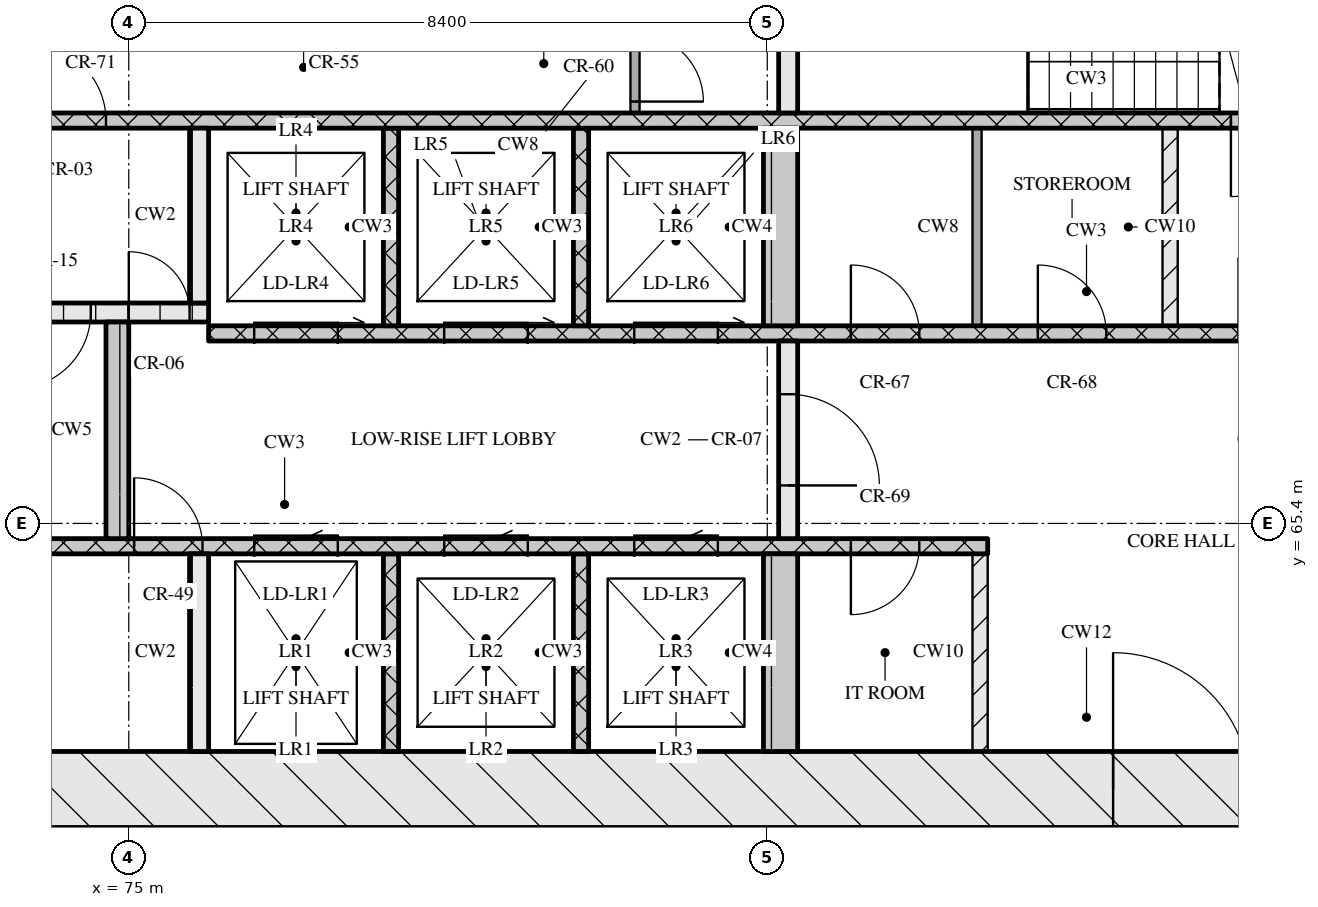
"""IFC4 building model, lengths in metres.
Left out: names, types, materials, properties, quantities, classifications, styles, units other than length and angle.
Written with IfcOpenShell. Run it as: python <this file> out.ifc"""

import sys

from ifc_helpers import new_model, si_unit, direction, frame, frame_2d, origin, place, context, subcontext, project, spatial, rectangle, extrude, element, fill, save


model = new_model("IFC4")
c1 = context("Model", 3, precision=1e-05, world=origin(), true_north=direction((0.0, 1.0)))
c2 = subcontext(c1, "Body", "Model", "MODEL_VIEW")
j1 = project(units=[si_unit("LENGTHUNIT", "METRE"), si_unit("PLANEANGLEUNIT", "RADIAN")], contexts=[c1])
p1 = place(None, origin())
s1 = spatial("IfcSite", under=j1, at=p1, CompositionType="ELEMENT")
p2 = place(p1, origin())
s2 = spatial("IfcBuilding", under=s1, at=p2, CompositionType="ELEMENT")
p3 = place(p2, frame((0.0, 0.0, 102.45)))
s3 = spatial("IfcBuildingStorey", under=s2, at=p3, CompositionType="ELEMENT", Elevation=102.45)
p4 = place(p3, frame((66.8, 61.9, 0.0), z_axis=(0.0, 0.0, 1.0), x_axis=(1.0, 0.0, 0.0)))
e1 = element("IfcWall", 1, at=p4, inside=s3, PredefinedType="SOLIDWALL", context=c2, shape_type="SweptSolid", body=[
    extrude(rectangle(XDim=41.6, YDim=1.0, at=frame_2d((20.8, 0.0))), origin(), (0.0, 0.0, 1.0), 3.32),
])
p5 = place(p4, frame((21.15, 0.0, 0.0)))
e2 = element("IfcOpeningElement", 2, at=p5, cuts=e1, PredefinedType="OPENING", context=c2, shape_type="SweptSolid", body=[
    extrude(rectangle(XDim=1.8, YDim=2.1, at=frame_2d((0.9, 1.05))), frame((0.0, 0.51, 0.0), z_axis=(0.0, -1.0, 0.0), x_axis=(1.0, 0.0, 0.0)), (0.0, 0.0, 1.0), 1.02),
])
p6 = place(p3, frame((75.925, 62.4, 0.0), z_axis=(0.0, 0.0, 1.0), x_axis=(0.0, 1.0, 0.0)))
e3 = element("IfcWall", 3, at=p6, inside=s3, PredefinedType="SOLIDWALL", context=c2, shape_type="SweptSolid", body=[
    extrude(rectangle(XDim=2.6, YDim=0.25, at=frame_2d((1.3, 0.0))), origin(), (0.0, 0.0, 1.0), 3.32),
])
for number, where, z_axis, x_axis in (
    (4, (78.45, 62.4, 0.0), (0.0, 0.0, 1.0), (0.0, 1.0, 0.0)),
    (5, (80.95, 62.4, 0.0), (0.0, 0.0, 1.0), (0.0, 1.0, 0.0)),
):
    element("IfcWall", number, at=place(p3, frame(where, z_axis=z_axis, x_axis=x_axis)), inside=s3, PredefinedType="SOLIDWALL", context=c2, shape_type="SweptSolid", body=[
        extrude(rectangle(XDim=2.6, YDim=0.2, at=frame_2d((1.3, 0.0))), origin(), (0.0, 0.0, 1.0), 3.32),
    ])
p7 = place(p3, frame((83.575, 62.4, 0.0), z_axis=(0.0, 0.0, 1.0), x_axis=(0.0, 1.0, 0.0)))
e6 = element("IfcWall", 6, at=p7, inside=s3, PredefinedType="SOLIDWALL", context=c2, shape_type="SweptSolid", body=[
    extrude(rectangle(XDim=2.6, YDim=0.45, at=frame_2d((1.3, 0.0))), origin(), (0.0, 0.0, 1.0), 3.32),
])
p8 = place(p3, frame((86.2, 62.4, 0.0), z_axis=(0.0, 0.0, 1.0), x_axis=(0.0, 1.0, 0.0)))
e7 = element("IfcWall", 7, at=p8, inside=s3, PredefinedType="PARTITIONING", context=c2, shape_type="SweptSolid", body=[
    extrude(rectangle(XDim=2.6, YDim=0.2, at=frame_2d((1.3, 0.0))), origin(), (0.0, 0.0, 1.0), 3.32),
])
p9 = place(p3, frame((67.8, 65.1, 0.0), z_axis=(0.0, 0.0, 1.0), x_axis=(1.0, 0.0, 0.0)))
e8 = element("IfcWall", 8, at=p9, inside=s3, PredefinedType="SOLIDWALL", context=c2, shape_type="SweptSolid", body=[
    extrude(rectangle(XDim=18.5, YDim=0.2, at=frame_2d((9.25, 0.0))), origin(), (0.0, 0.0, 1.0), 3.32),
])
p10 = place(p9, frame((7.27, 0.0, 0.0)))
e9 = element("IfcOpeningElement", 9, at=p10, cuts=e8, PredefinedType="OPENING", context=c2, shape_type="SweptSolid", body=[
    extrude(rectangle(XDim=0.9, YDim=2.1, at=frame_2d((0.45, 1.05))), frame((0.0, 0.11, 0.0), z_axis=(0.0, -1.0, 0.0), x_axis=(1.0, 0.0, 0.0)), (0.0, 0.0, 1.0), 0.22),
])
p11 = place(p9, frame((8.85, 0.0, 0.0)))
e10 = element("IfcOpeningElement", 10, at=p11, cuts=e8, PredefinedType="OPENING", context=c2, shape_type="SweptSolid", body=[
    extrude(rectangle(XDim=1.1, YDim=2.1, at=frame_2d((0.55, 1.05))), frame((0.0, 0.11, 0.0), z_axis=(0.0, -1.0, 0.0), x_axis=(1.0, 0.0, 0.0)), (0.0, 0.0, 1.0), 0.22),
])
p12 = place(p9, frame((11.35, 0.0, 0.0)))
e11 = element("IfcOpeningElement", 11, at=p12, cuts=e8, PredefinedType="OPENING", context=c2, shape_type="SweptSolid", body=[
    extrude(rectangle(XDim=1.1, YDim=2.1, at=frame_2d((0.55, 1.05))), frame((0.0, 0.11, 0.0), z_axis=(0.0, -1.0, 0.0), x_axis=(1.0, 0.0, 0.0)), (0.0, 0.0, 1.0), 0.22),
])
p13 = place(p9, frame((13.85, 0.0, 0.0)))
e12 = element("IfcOpeningElement", 12, at=p13, cuts=e8, PredefinedType="OPENING", context=c2, shape_type="SweptSolid", body=[
    extrude(rectangle(XDim=1.1, YDim=2.1, at=frame_2d((0.55, 1.05))), frame((0.0, 0.11, 0.0), z_axis=(0.0, -1.0, 0.0), x_axis=(1.0, 0.0, 0.0)), (0.0, 0.0, 1.0), 0.22),
])
p14 = place(p9, frame((16.7, 0.0, 0.0)))
e13 = element("IfcOpeningElement", 13, at=p14, cuts=e8, PredefinedType="OPENING", context=c2, shape_type="SweptSolid", body=[
    extrude(rectangle(XDim=0.9, YDim=2.1, at=frame_2d((0.45, 1.05))), frame((0.0, 0.11, 0.0), z_axis=(0.0, -1.0, 0.0), x_axis=(1.0, 0.0, 0.0)), (0.0, 0.0, 1.0), 0.22),
])
p15 = place(p3, frame((74.85, 65.2, 0.0), z_axis=(0.0, 0.0, 1.0), x_axis=(0.0, 1.0, 0.0)))
e14 = element("IfcWall", 14, at=p15, inside=s3, PredefinedType="SOLIDWALL", context=c2, shape_type="SweptSolid", body=[
    extrude(rectangle(XDim=2.85, YDim=0.3, at=frame_2d((1.425, 0.0))), origin(), (0.0, 0.0, 1.0), 3.32),
])
p16 = place(p3, frame((83.675, 65.2, 0.0), z_axis=(0.0, 0.0, 1.0), x_axis=(0.0, 1.0, 0.0)))
e15 = element("IfcWall", 15, at=p16, inside=s3, PredefinedType="SOLIDWALL", context=c2, shape_type="SweptSolid", body=[
    extrude(rectangle(XDim=2.6, YDim=0.25, at=frame_2d((1.3, 0.0))), origin(), (0.0, 0.0, 1.0), 3.32),
])
p17 = place(p16, frame((0.7, 0.0, 0.0)))
e16 = element("IfcOpeningElement", 16, at=p17, cuts=e15, PredefinedType="OPENING", context=c2, shape_type="SweptSolid", body=[
    extrude(rectangle(XDim=1.2, YDim=2.1, at=frame_2d((0.6, 1.05))), frame((0.0, 0.135, 0.0), z_axis=(0.0, -1.0, 0.0), x_axis=(1.0, 0.0, 0.0)), (0.0, 0.0, 1.0), 0.27),
])
p18 = place(p3, frame((76.05, 67.9, 0.0), z_axis=(0.0, 0.0, 1.0), x_axis=(1.0, 0.0, 0.0)))
e17 = element("IfcWall", 17, at=p18, inside=s3, PredefinedType="SOLIDWALL", context=c2, shape_type="SweptSolid", body=[
    extrude(rectangle(XDim=23.1, YDim=0.2, at=frame_2d((11.55, 0.0))), origin(), (0.0, 0.0, 1.0), 3.32),
])
p19 = place(p18, frame((0.6, 0.0, 0.0)))
e18 = element("IfcOpeningElement", 18, at=p19, cuts=e17, PredefinedType="OPENING", context=c2, shape_type="SweptSolid", body=[
    extrude(rectangle(XDim=1.1, YDim=2.1, at=frame_2d((0.55, 1.05))), frame((0.0, 0.11, 0.0), z_axis=(0.0, -1.0, 0.0), x_axis=(1.0, 0.0, 0.0)), (0.0, 0.0, 1.0), 0.22),
])
p20 = place(p18, frame((3.1, 0.0, 0.0)))
e19 = element("IfcOpeningElement", 19, at=p20, cuts=e17, PredefinedType="OPENING", context=c2, shape_type="SweptSolid", body=[
    extrude(rectangle(XDim=1.1, YDim=2.1, at=frame_2d((0.55, 1.05))), frame((0.0, 0.11, 0.0), z_axis=(0.0, -1.0, 0.0), x_axis=(1.0, 0.0, 0.0)), (0.0, 0.0, 1.0), 0.22),
])
p21 = place(p18, frame((5.6, 0.0, 0.0)))
e20 = element("IfcOpeningElement", 20, at=p21, cuts=e17, PredefinedType="OPENING", context=c2, shape_type="SweptSolid", body=[
    extrude(rectangle(XDim=1.1, YDim=2.1, at=frame_2d((0.55, 1.05))), frame((0.0, 0.11, 0.0), z_axis=(0.0, -1.0, 0.0), x_axis=(1.0, 0.0, 0.0)), (0.0, 0.0, 1.0), 0.22),
])
p22 = place(p18, frame((8.45, 0.0, 0.0)))
e21 = element("IfcOpeningElement", 21, at=p22, cuts=e17, PredefinedType="OPENING", context=c2, shape_type="SweptSolid", body=[
    extrude(rectangle(XDim=0.9, YDim=2.1, at=frame_2d((0.45, 1.05))), frame((0.0, 0.11, 0.0), z_axis=(0.0, -1.0, 0.0), x_axis=(1.0, 0.0, 0.0)), (0.0, 0.0, 1.0), 0.22),
])
p23 = place(p18, frame((10.91, 0.0, 0.0)))
e22 = element("IfcOpeningElement", 22, at=p23, cuts=e17, PredefinedType="OPENING", context=c2, shape_type="SweptSolid", body=[
    extrude(rectangle(XDim=0.9, YDim=2.1, at=frame_2d((0.45, 1.05))), frame((0.0, 0.11, 0.0), z_axis=(0.0, -1.0, 0.0), x_axis=(1.0, 0.0, 0.0)), (0.0, 0.0, 1.0), 0.22),
])
p24 = place(p18, frame((13.55, 0.0, 0.0)))
e23 = element("IfcOpeningElement", 23, at=p24, cuts=e17, PredefinedType="OPENING", context=c2, shape_type="SweptSolid", body=[
    extrude(rectangle(XDim=1.0, YDim=2.1, at=frame_2d((0.5, 1.05))), frame((0.0, 0.11, 0.0), z_axis=(0.0, -1.0, 0.0), x_axis=(1.0, 0.0, 0.0)), (0.0, 0.0, 1.0), 0.22),
])
for number, where, z_axis, x_axis in (
    (24, (78.45, 68.0, 0.0), (0.0, 0.0, 1.0), (0.0, 1.0, 0.0)),
    (25, (80.95, 68.0, 0.0), (0.0, 0.0, 1.0), (0.0, 1.0, 0.0)),
):
    element("IfcWall", number, at=place(p3, frame(where, z_axis=z_axis, x_axis=x_axis)), inside=s3, PredefinedType="SOLIDWALL", context=c2, shape_type="SweptSolid", body=[
        extrude(rectangle(XDim=2.6, YDim=0.2, at=frame_2d((1.3, 0.0))), origin(), (0.0, 0.0, 1.0), 3.32),
    ])
p25 = place(p3, frame((83.575, 68.0, 0.0), z_axis=(0.0, 0.0, 1.0), x_axis=(0.0, 1.0, 0.0)))
e26 = element("IfcWall", 26, at=p25, inside=s3, PredefinedType="SOLIDWALL", context=c2, shape_type="SweptSolid", body=[
    extrude(rectangle(XDim=2.6, YDim=0.45, at=frame_2d((1.3, 0.0))), origin(), (0.0, 0.0, 1.0), 3.32),
])
p26 = place(p3, frame((86.16, 68.0, 0.0), z_axis=(0.0, 0.0, 1.0), x_axis=(0.0, 1.0, 0.0)))
e27 = element("IfcWall", 27, at=p26, inside=s3, PredefinedType="PARTITIONING", context=c2, shape_type="SweptSolid", body=[
    extrude(rectangle(XDim=2.6, YDim=0.12, at=frame_2d((1.3, 0.0))), origin(), (0.0, 0.0, 1.0), 3.32),
])
p27 = place(p3, frame((88.7, 68.0, 0.0), z_axis=(0.0, 0.0, 1.0), x_axis=(0.0, 1.0, 0.0)))
e28 = element("IfcWall", 28, at=p27, inside=s3, PredefinedType="PARTITIONING", context=c2, shape_type="SweptSolid", body=[
    extrude(rectangle(XDim=2.6, YDim=0.2, at=frame_2d((1.3, 0.0))), origin(), (0.0, 0.0, 1.0), 3.32),
])
p28 = place(p3, frame((67.8, 68.175, 0.0), z_axis=(0.0, 0.0, 1.0), x_axis=(1.0, 0.0, 0.0)))
e29 = element("IfcWall", 29, at=p28, inside=s3, PredefinedType="SOLIDWALL", context=c2, shape_type="SweptSolid", body=[
    extrude(rectangle(XDim=8.25, YDim=0.25, at=frame_2d((4.125, 0.0))), origin(), (0.0, 0.0, 1.0), 3.32),
])
p29 = place(p28, frame((5.7, 0.0, 0.0)))
e30 = element("IfcOpeningElement", 30, at=p29, cuts=e29, PredefinedType="OPENING", context=c2, shape_type="SweptSolid", body=[
    extrude(rectangle(XDim=1.0, YDim=2.1, at=frame_2d((0.5, 1.05))), frame((0.0, 0.135, 0.0), z_axis=(0.0, -1.0, 0.0), x_axis=(1.0, 0.0, 0.0)), (0.0, 0.0, 1.0), 0.27),
])
p30 = place(p28, frame((7.2, 0.0, 0.0)))
e31 = element("IfcOpeningElement", 31, at=p30, cuts=e29, PredefinedType="OPENING", context=c2, shape_type="SweptSolid", body=[
    extrude(rectangle(XDim=0.8, YDim=2.1, at=frame_2d((0.4, 1.05))), frame((0.0, 0.135, 0.0), z_axis=(0.0, -1.0, 0.0), x_axis=(1.0, 0.0, 0.0)), (0.0, 0.0, 1.0), 0.27),
])
p31 = place(p3, frame((75.925, 68.3, 0.0), z_axis=(0.0, 0.0, 1.0), x_axis=(0.0, 1.0, 0.0)))
e32 = element("IfcWall", 32, at=p31, inside=s3, PredefinedType="SOLIDWALL", context=c2, shape_type="SweptSolid", body=[
    extrude(rectangle(XDim=2.3, YDim=0.25, at=frame_2d((1.15, 0.0))), origin(), (0.0, 0.0, 1.0), 3.32),
])
p32 = place(p3, frame((67.8, 70.7, 0.0), z_axis=(0.0, 0.0, 1.0), x_axis=(1.0, 0.0, 0.0)))
e33 = element("IfcWall", 33, at=p32, inside=s3, PredefinedType="SOLIDWALL", context=c2, shape_type="SweptSolid", body=[
    extrude(rectangle(XDim=39.6, YDim=0.2, at=frame_2d((19.8, 0.0))), origin(), (0.0, 0.0, 1.0), 3.32),
])
p33 = place(p32, frame((0.65, 0.0, 0.0)))
e34 = element("IfcOpeningElement", 34, at=p33, cuts=e33, PredefinedType="OPENING", context=c2, shape_type="SweptSolid", body=[
    extrude(rectangle(XDim=1.1, YDim=2.1, at=frame_2d((0.55, 1.05))), frame((0.0, 0.11, 0.0), z_axis=(0.0, -1.0, 0.0), x_axis=(1.0, 0.0, 0.0)), (0.0, 0.0, 1.0), 0.22),
])
p34 = place(p32, frame((3.25, 0.0, 0.0)))
e35 = element("IfcOpeningElement", 35, at=p34, cuts=e33, PredefinedType="OPENING", context=c2, shape_type="SweptSolid", body=[
    extrude(rectangle(XDim=1.1, YDim=2.1, at=frame_2d((0.55, 1.05))), frame((0.0, 0.11, 0.0), z_axis=(0.0, -1.0, 0.0), x_axis=(1.0, 0.0, 0.0)), (0.0, 0.0, 1.0), 0.22),
])
p35 = place(p32, frame((5.9, 0.0, 0.0)))
e36 = element("IfcOpeningElement", 36, at=p35, cuts=e33, PredefinedType="OPENING", context=c2, shape_type="SweptSolid", body=[
    extrude(rectangle(XDim=1.0, YDim=2.1, at=frame_2d((0.5, 1.05))), frame((0.0, 0.11, 0.0), z_axis=(0.0, -1.0, 0.0), x_axis=(1.0, 0.0, 0.0)), (0.0, 0.0, 1.0), 0.22),
])
p36 = place(p32, frame((21.7, 0.0, 0.0)))
e37 = element("IfcOpeningElement", 37, at=p36, cuts=e33, PredefinedType="OPENING", context=c2, shape_type="SweptSolid", body=[
    extrude(rectangle(XDim=1.0, YDim=2.1, at=frame_2d((0.5, 1.05))), frame((0.0, 0.11, 0.0), z_axis=(0.0, -1.0, 0.0), x_axis=(1.0, 0.0, 0.0)), (0.0, 0.0, 1.0), 0.22),
])
p37 = place(p32, frame((32.7, 0.0, 0.0)))
e38 = element("IfcOpeningElement", 38, at=p37, cuts=e33, PredefinedType="OPENING", context=c2, shape_type="SweptSolid", body=[
    extrude(rectangle(XDim=1.0, YDim=2.1, at=frame_2d((0.5, 1.05))), frame((0.0, 0.11, 0.0), z_axis=(0.0, -1.0, 0.0), x_axis=(1.0, 0.0, 0.0)), (0.0, 0.0, 1.0), 0.22),
])
p38 = place(p32, frame((35.25, 0.0, 0.0)))
e39 = element("IfcOpeningElement", 39, at=p38, cuts=e33, PredefinedType="OPENING", context=c2, shape_type="SweptSolid", body=[
    extrude(rectangle(XDim=1.1, YDim=2.1, at=frame_2d((0.55, 1.05))), frame((0.0, 0.11, 0.0), z_axis=(0.0, -1.0, 0.0), x_axis=(1.0, 0.0, 0.0)), (0.0, 0.0, 1.0), 0.22),
])
p39 = place(p32, frame((37.85, 0.0, 0.0)))
e40 = element("IfcOpeningElement", 40, at=p39, cuts=e33, PredefinedType="OPENING", context=c2, shape_type="SweptSolid", body=[
    extrude(rectangle(XDim=1.1, YDim=2.1, at=frame_2d((0.55, 1.05))), frame((0.0, 0.11, 0.0), z_axis=(0.0, -1.0, 0.0), x_axis=(1.0, 0.0, 0.0)), (0.0, 0.0, 1.0), 0.22),
])
p40 = place(p3, frame((81.66, 70.8, 0.0), z_axis=(0.0, 0.0, 1.0), x_axis=(0.0, 1.0, 0.0)))
e41 = element("IfcWall", 41, at=p40, inside=s3, PredefinedType="PARTITIONING", context=c2, shape_type="SweptSolid", body=[
    extrude(rectangle(XDim=1.2, YDim=0.12, at=frame_2d((0.6, 0.0))), origin(), (0.0, 0.0, 1.0), 3.32),
])
p41 = place(p40, frame((0.15, 0.0, 0.0)))
e42 = element("IfcOpeningElement", 42, at=p41, cuts=e41, PredefinedType="OPENING", context=c2, shape_type="SweptSolid", body=[
    extrude(rectangle(XDim=0.9, YDim=2.1, at=frame_2d((0.45, 1.05))), frame((0.0, 0.07, 0.0), z_axis=(0.0, -1.0, 0.0), x_axis=(1.0, 0.0, 0.0)), (0.0, 0.0, 1.0), 0.14),
])
p42 = place(p3, frame((83.675, 70.8, 0.0), z_axis=(0.0, 0.0, 1.0), x_axis=(0.0, 1.0, 0.0)))
e43 = element("IfcWall", 43, at=p42, inside=s3, PredefinedType="SOLIDWALL", context=c2, shape_type="SweptSolid", body=[
    extrude(rectangle(XDim=2.95, YDim=0.25, at=frame_2d((1.475, 0.0))), origin(), (0.0, 0.0, 1.0), 3.32),
])
p43 = place(p5, origin())
e44 = element("IfcDoor", 44, at=p43, inside=s3, OperationType="DOUBLE_DOOR_SINGLE_SWING", PredefinedType="DOOR", context=c2, shape_type="SweptSolid", body=[
    extrude(rectangle(XDim=1.8, YDim=2.1, at=frame_2d((0.9, 1.05))), frame((0.0, 0.025, 0.0), z_axis=(0.0, -1.0, 0.0), x_axis=(1.0, 0.0, 0.0)), (0.0, 0.0, 1.0), 0.05),
])
fill(e2, e44)
p44 = place(p10, origin())
e45 = element("IfcDoor", 45, at=p44, inside=s3, OperationType="SINGLE_SWING_LEFT", PredefinedType="DOOR", context=c2, shape_type="SweptSolid", body=[
    extrude(rectangle(XDim=0.9, YDim=2.1, at=frame_2d((0.45, 1.05))), frame((0.0, 0.025, 0.0), z_axis=(0.0, -1.0, 0.0), x_axis=(1.0, 0.0, 0.0)), (0.0, 0.0, 1.0), 0.05),
])
fill(e9, e45)
p45 = place(p11, origin())
e46 = element("IfcDoor", 46, at=p45, inside=s3, OperationType="SLIDING_TO_LEFT", PredefinedType="DOOR", context=c2, shape_type="SweptSolid", body=[
    extrude(rectangle(XDim=1.1, YDim=2.1, at=frame_2d((0.55, 1.05))), frame((0.0, 0.025, 0.0), z_axis=(0.0, -1.0, 0.0), x_axis=(1.0, 0.0, 0.0)), (0.0, 0.0, 1.0), 0.05),
])
fill(e10, e46)
p46 = place(p12, origin())
e47 = element("IfcDoor", 47, at=p46, inside=s3, OperationType="SLIDING_TO_LEFT", PredefinedType="DOOR", context=c2, shape_type="SweptSolid", body=[
    extrude(rectangle(XDim=1.1, YDim=2.1, at=frame_2d((0.55, 1.05))), frame((0.0, 0.025, 0.0), z_axis=(0.0, -1.0, 0.0), x_axis=(1.0, 0.0, 0.0)), (0.0, 0.0, 1.0), 0.05),
])
fill(e11, e47)
p47 = place(p13, origin())
e48 = element("IfcDoor", 48, at=p47, inside=s3, OperationType="SLIDING_TO_LEFT", PredefinedType="DOOR", context=c2, shape_type="SweptSolid", body=[
    extrude(rectangle(XDim=1.1, YDim=2.1, at=frame_2d((0.55, 1.05))), frame((0.0, 0.025, 0.0), z_axis=(0.0, -1.0, 0.0), x_axis=(1.0, 0.0, 0.0)), (0.0, 0.0, 1.0), 0.05),
])
fill(e12, e48)
p48 = place(p14, origin())
e49 = element("IfcDoor", 49, at=p48, inside=s3, OperationType="SINGLE_SWING_RIGHT", PredefinedType="DOOR", context=c2, shape_type="SweptSolid", body=[
    extrude(rectangle(XDim=0.9, YDim=2.1, at=frame_2d((0.45, 1.05))), frame((0.0, 0.025, 0.0), z_axis=(0.0, -1.0, 0.0), x_axis=(1.0, 0.0, 0.0)), (0.0, 0.0, 1.0), 0.05),
])
fill(e13, e49)
p49 = place(p17, origin())
e50 = element("IfcDoor", 50, at=p49, inside=s3, OperationType="SINGLE_SWING_RIGHT", PredefinedType="DOOR", context=c2, shape_type="SweptSolid", body=[
    extrude(rectangle(XDim=1.2, YDim=2.1, at=frame_2d((0.6, 1.05))), frame((0.0, 0.025, 0.0), z_axis=(0.0, -1.0, 0.0), x_axis=(1.0, 0.0, 0.0)), (0.0, 0.0, 1.0), 0.05),
])
fill(e16, e50)
p50 = place(p19, origin())
e51 = element("IfcDoor", 51, at=p50, inside=s3, OperationType="SLIDING_TO_RIGHT", PredefinedType="DOOR", context=c2, shape_type="SweptSolid", body=[
    extrude(rectangle(XDim=1.1, YDim=2.1, at=frame_2d((0.55, 1.05))), frame((0.0, 0.025, 0.0), z_axis=(0.0, -1.0, 0.0), x_axis=(1.0, 0.0, 0.0)), (0.0, 0.0, 1.0), 0.05),
])
fill(e18, e51)
p51 = place(p20, origin())
e52 = element("IfcDoor", 52, at=p51, inside=s3, OperationType="SLIDING_TO_RIGHT", PredefinedType="DOOR", context=c2, shape_type="SweptSolid", body=[
    extrude(rectangle(XDim=1.1, YDim=2.1, at=frame_2d((0.55, 1.05))), frame((0.0, 0.025, 0.0), z_axis=(0.0, -1.0, 0.0), x_axis=(1.0, 0.0, 0.0)), (0.0, 0.0, 1.0), 0.05),
])
fill(e19, e52)
p52 = place(p21, origin())
e53 = element("IfcDoor", 53, at=p52, inside=s3, OperationType="SLIDING_TO_RIGHT", PredefinedType="DOOR", context=c2, shape_type="SweptSolid", body=[
    extrude(rectangle(XDim=1.1, YDim=2.1, at=frame_2d((0.55, 1.05))), frame((0.0, 0.025, 0.0), z_axis=(0.0, -1.0, 0.0), x_axis=(1.0, 0.0, 0.0)), (0.0, 0.0, 1.0), 0.05),
])
fill(e20, e53)
p53 = place(p22, origin())
e54 = element("IfcDoor", 54, at=p53, inside=s3, OperationType="SINGLE_SWING_LEFT", PredefinedType="DOOR", context=c2, shape_type="SweptSolid", body=[
    extrude(rectangle(XDim=0.9, YDim=2.1, at=frame_2d((0.45, 1.05))), frame((0.0, 0.025, 0.0), z_axis=(0.0, -1.0, 0.0), x_axis=(1.0, 0.0, 0.0)), (0.0, 0.0, 1.0), 0.05),
])
fill(e21, e54)
p54 = place(p23, origin())
e55 = element("IfcDoor", 55, at=p54, inside=s3, OperationType="SINGLE_SWING_LEFT", PredefinedType="DOOR", context=c2, shape_type="SweptSolid", body=[
    extrude(rectangle(XDim=0.9, YDim=2.1, at=frame_2d((0.45, 1.05))), frame((0.0, 0.025, 0.0), z_axis=(0.0, -1.0, 0.0), x_axis=(1.0, 0.0, 0.0)), (0.0, 0.0, 1.0), 0.05),
])
fill(e22, e55)
p55 = place(p29, origin())
e56 = element("IfcDoor", 56, at=p55, inside=s3, OperationType="SINGLE_SWING_RIGHT", PredefinedType="DOOR", context=c2, shape_type="SweptSolid", body=[
    extrude(rectangle(XDim=1.0, YDim=2.1, at=frame_2d((0.5, 1.05))), frame((0.0, 0.025, 0.0), z_axis=(0.0, -1.0, 0.0), x_axis=(1.0, 0.0, 0.0)), (0.0, 0.0, 1.0), 0.05),
])
fill(e30, e56)
p56 = place(p30, origin())
e57 = element("IfcDoor", 57, at=p56, inside=s3, OperationType="SINGLE_SWING_LEFT", PredefinedType="DOOR", context=c2, shape_type="SweptSolid", body=[
    extrude(rectangle(XDim=0.8, YDim=2.1, at=frame_2d((0.4, 1.05))), frame((0.0, 0.025, 0.0), z_axis=(0.0, -1.0, 0.0), x_axis=(1.0, 0.0, 0.0)), (0.0, 0.0, 1.0), 0.05),
])
fill(e31, e57)
p57 = place(p35, origin())
e58 = element("IfcDoor", 58, at=p57, inside=s3, OperationType="SINGLE_SWING_LEFT", PredefinedType="DOOR", context=c2, shape_type="SweptSolid", body=[
    extrude(rectangle(XDim=1.0, YDim=2.1, at=frame_2d((0.5, 1.05))), frame((0.0, 0.025, 0.0), z_axis=(0.0, -1.0, 0.0), x_axis=(1.0, 0.0, 0.0)), (0.0, 0.0, 1.0), 0.05),
])
fill(e36, e58)
p58 = place(p36, origin())
e59 = element("IfcDoor", 59, at=p58, inside=s3, OperationType="SINGLE_SWING_RIGHT", PredefinedType="DOOR", context=c2, shape_type="SweptSolid", body=[
    extrude(rectangle(XDim=1.0, YDim=2.1, at=frame_2d((0.5, 1.05))), frame((0.0, 0.025, 0.0), z_axis=(0.0, -1.0, 0.0), x_axis=(1.0, 0.0, 0.0)), (0.0, 0.0, 1.0), 0.05),
])
fill(e37, e59)
p59 = place(p41, origin())
e60 = element("IfcDoor", 60, at=p59, inside=s3, OperationType="SINGLE_SWING_RIGHT", PredefinedType="DOOR", context=c2, shape_type="SweptSolid", body=[
    extrude(rectangle(XDim=0.9, YDim=2.1, at=frame_2d((0.45, 1.05))), frame((0.0, 0.025, 0.0), z_axis=(0.0, -1.0, 0.0), x_axis=(1.0, 0.0, 0.0)), (0.0, 0.0, 1.0), 0.05),
])
fill(e42, e60)
save(model, sys.argv[1])
